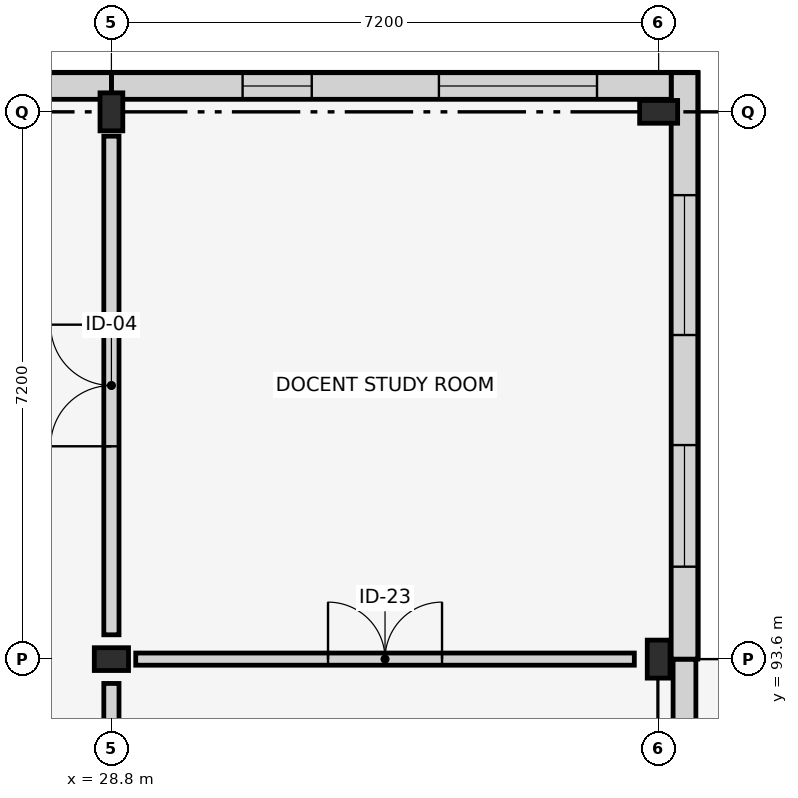
"""IFC4 building model, lengths in metres.
Left out: names, types, materials, properties, quantities, classifications, styles, units other than length and angle.
Written with IfcOpenShell. Run it as: python <this file> out.ifc"""

import sys

from ifc_helpers import new_model, si_unit, direction, frame, frame_2d, origin, origin_2d, place, context, subcontext, project, spatial, rectangle, i_section, extrude, element, fill, save


model = new_model("IFC4")
c1 = context("Model", 3, precision=1e-05, world=origin(), true_north=direction((0.0, 1.0)))
c2 = subcontext(c1, "Body", "Model", "MODEL_VIEW")
j1 = project(units=[si_unit("LENGTHUNIT", "METRE"), si_unit("PLANEANGLEUNIT", "RADIAN")], contexts=[c1])
p1 = place(None, origin())
s1 = spatial("IfcSite", under=j1, at=p1, CompositionType="ELEMENT")
p2 = place(p1, origin())
s2 = spatial("IfcBuilding", under=s1, at=p2, CompositionType="ELEMENT")
p3 = place(p2, origin())
s3 = spatial("IfcBuildingStorey", under=s2, at=p3, CompositionType="ELEMENT", Elevation=0.0)
p4 = place(p3, frame((28.8, 93.6, 0.0), z_axis=(0.0, 0.0, 1.0), x_axis=(0.0, 1.0, 0.0)))
e1 = element("IfcColumn", 1, at=p4, inside=s3, PredefinedType="COLUMN", context=c2, shape_type="SweptSolid", body=[
    extrude(i_section(OverallWidth=0.3, OverallDepth=0.45, WebThickness=0.014, FlangeThickness=0.026, FilletRadius=0.027, at=origin_2d()), origin(), (0.0, 0.0, 1.0), 4.5),
])
for number, where, z_axis, x_axis in (
    (2, (28.8, 100.8, 0.0), (0.0, 0.0, 1.0), (1.0, 0.0, 0.0)),
    (3, (36.0, 93.6, 0.0), (0.0, 0.0, 1.0), (1.0, 0.0, 0.0)),
    (4, (36.0, 100.8, 0.0), (0.0, 0.0, 1.0), (0.0, 1.0, 0.0)),
):
    element("IfcColumn", number, at=place(p3, frame(where, z_axis=z_axis, x_axis=x_axis)), inside=s3, PredefinedType="COLUMN", context=c2, shape_type="SweptSolid", body=[
        extrude(i_section(OverallWidth=0.3, OverallDepth=0.5, WebThickness=0.014, FlangeThickness=0.028, FilletRadius=0.027, at=origin_2d()), origin(), (0.0, 0.0, 1.0), 4.5),
    ])
p5 = place(p3, frame((36.34, 86.4, 0.0), z_axis=(0.0, 0.0, 1.0), x_axis=(0.0, 1.0, 0.0)))
e5 = element("IfcWall", 5, at=p5, inside=s3, PredefinedType="STANDARD", context=c2, shape_type="SweptSolid", body=[
    extrude(rectangle(XDim=7.2, YDim=0.3, at=frame_2d((3.6, 0.0))), origin(), (0.0, 0.0, 1.0), 3.95),
])
p6 = place(p5, frame((2.65, 0.0, 0.0)))
e6 = element("IfcOpeningElement", 6, at=p6, cuts=e5, PredefinedType="OPENING", context=c2, shape_type="SweptSolid", body=[
    extrude(rectangle(XDim=1.9, YDim=2.45, at=frame_2d((0.95, 1.225))), frame((0.0, 0.16, 0.0), z_axis=(0.0, -1.0, 0.0), x_axis=(1.0, 0.0, 0.0)), (0.0, 0.0, 1.0), 0.32),
])
p7 = place(p3, frame((36.34, 93.6, 0.0), z_axis=(0.0, 0.0, 1.0), x_axis=(0.0, 1.0, 0.0)))
e7 = element("IfcWall", 7, at=p7, inside=s3, PredefinedType="STANDARD", context=c2, shape_type="SweptSolid", body=[
    extrude(rectangle(XDim=7.715, YDim=0.35, at=frame_2d((3.857, 0.0))), origin(), (0.0, 0.0, 1.0), 4.5),
])
p8 = place(p7, frame((1.216, 0.0, 0.9)))
e8 = element("IfcOpeningElement", 8, at=p8, cuts=e7, PredefinedType="OPENING", context=c2, shape_type="SweptSolid", body=[
    extrude(rectangle(XDim=1.6, YDim=1.54, at=frame_2d((0.8, 0.77))), frame((0.0, 0.185, 0.0), z_axis=(0.0, -1.0, 0.0), x_axis=(1.0, 0.0, 0.0)), (0.0, 0.0, 1.0), 0.37),
])
p9 = place(p7, frame((4.264, 0.0, 0.9)))
e9 = element("IfcOpeningElement", 9, at=p9, cuts=e7, PredefinedType="OPENING", context=c2, shape_type="SweptSolid", body=[
    extrude(rectangle(XDim=1.84, YDim=1.54, at=frame_2d((0.92, 0.77))), frame((0.0, 0.185, 0.0), z_axis=(0.0, -1.0, 0.0), x_axis=(1.0, 0.0, 0.0)), (0.0, 0.0, 1.0), 0.37),
])
p10 = place(p3, frame((36.165, 101.14, 0.0), z_axis=(0.0, 0.0, 1.0), x_axis=(-1.0, 0.0, 0.0)))
e10 = element("IfcWall", 10, at=p10, inside=s3, PredefinedType="STANDARD", context=c2, shape_type="SweptSolid", body=[
    extrude(rectangle(XDim=7.365, YDim=0.35, at=frame_2d((3.683, 0.0))), origin(), (0.0, 0.0, 1.0), 4.5),
])
p11 = place(p10, frame((0.976, 0.0, 0.9)))
e11 = element("IfcOpeningElement", 11, at=p11, cuts=e10, PredefinedType="OPENING", context=c2, shape_type="SweptSolid", body=[
    extrude(rectangle(XDim=2.08, YDim=1.54, at=frame_2d((1.04, 0.77))), frame((0.0, 0.185, 0.0), z_axis=(0.0, -1.0, 0.0), x_axis=(1.0, 0.0, 0.0)), (0.0, 0.0, 1.0), 0.37),
])
p12 = place(p10, frame((4.729, 0.0, 0.9)))
e12 = element("IfcOpeningElement", 12, at=p12, cuts=e10, PredefinedType="OPENING", context=c2, shape_type="SweptSolid", body=[
    extrude(rectangle(XDim=0.91, YDim=1.68, at=frame_2d((0.455, 0.84))), frame((0.0, 0.185, 0.0), z_axis=(0.0, -1.0, 0.0), x_axis=(1.0, 0.0, 0.0)), (0.0, 0.0, 1.0), 0.37),
])
p13 = place(p3, frame((28.8, 101.14, 0.0), z_axis=(0.0, 0.0, 1.0), x_axis=(-1.0, 0.0, 0.0)))
e13 = element("IfcWall", 13, at=p13, inside=s3, PredefinedType="STANDARD", context=c2, shape_type="SweptSolid", body=[
    extrude(rectangle(XDim=7.2, YDim=0.35, at=frame_2d((3.6, 0.0))), origin(), (0.0, 0.0, 1.0), 4.5),
])
p14 = place(p13, frame((1.441, 0.0, 0.9)))
e14 = element("IfcOpeningElement", 14, at=p14, cuts=e13, PredefinedType="OPENING", context=c2, shape_type="SweptSolid", body=[
    extrude(rectangle(XDim=1.15, YDim=1.68, at=frame_2d((0.575, 0.84))), frame((0.0, 0.185, 0.0), z_axis=(0.0, -1.0, 0.0), x_axis=(1.0, 0.0, 0.0)), (0.0, 0.0, 1.0), 0.37),
])
p15 = place(p13, frame((4.489, 0.0, 0.9)))
e15 = element("IfcOpeningElement", 15, at=p15, cuts=e13, PredefinedType="OPENING", context=c2, shape_type="SweptSolid", body=[
    extrude(rectangle(XDim=1.39, YDim=1.68, at=frame_2d((0.695, 0.84))), frame((0.0, 0.185, 0.0), z_axis=(0.0, -1.0, 0.0), x_axis=(1.0, 0.0, 0.0)), (0.0, 0.0, 1.0), 0.37),
])
p16 = place(p3, frame((28.8, 72.32, 0.0), z_axis=(0.0, 0.0, 1.0), x_axis=(0.0, 1.0, 0.0)))
e16 = element("IfcWall", 16, at=p16, inside=s3, PredefinedType="PARTITIONING", context=c2, shape_type="SweptSolid", body=[
    extrude(rectangle(XDim=20.96, YDim=0.2, at=frame_2d((10.48, 0.0))), origin(), (0.0, 0.0, 1.0), 3.45),
])
p17 = place(p16, frame((9.73, 0.0, 0.0)))
e17 = element("IfcOpeningElement", 17, at=p17, cuts=e16, PredefinedType="OPENING", context=c2, shape_type="SweptSolid", body=[
    extrude(rectangle(XDim=1.5, YDim=2.25, at=frame_2d((0.75, 1.125))), frame((0.0, 0.11, 0.0), z_axis=(0.0, -1.0, 0.0), x_axis=(1.0, 0.0, 0.0)), (0.0, 0.0, 1.0), 0.22),
])
p18 = place(p3, frame((28.8, 93.92, 0.0), z_axis=(0.0, 0.0, 1.0), x_axis=(0.0, 1.0, 0.0)))
e18 = element("IfcWall", 18, at=p18, inside=s3, PredefinedType="PARTITIONING", context=c2, shape_type="SweptSolid", body=[
    extrude(rectangle(XDim=6.56, YDim=0.2, at=frame_2d((3.28, 0.0))), origin(), (0.0, 0.0, 1.0), 3.45),
])
p19 = place(p18, frame((2.48, 0.0, 0.0)))
e19 = element("IfcOpeningElement", 19, at=p19, cuts=e18, PredefinedType="OPENING", context=c2, shape_type="SweptSolid", body=[
    extrude(rectangle(XDim=1.6, YDim=2.35, at=frame_2d((0.8, 1.175))), frame((0.0, 0.11, 0.0), z_axis=(0.0, -1.0, 0.0), x_axis=(1.0, 0.0, 0.0)), (0.0, 0.0, 1.0), 0.22),
])
p20 = place(p3, frame((29.12, 93.6, 0.0), z_axis=(0.0, 0.0, 1.0), x_axis=(1.0, 0.0, 0.0)))
e20 = element("IfcWall", 20, at=p20, inside=s3, PredefinedType="PARTITIONING", context=c2, shape_type="SweptSolid", body=[
    extrude(rectangle(XDim=6.56, YDim=0.16, at=frame_2d((3.28, 0.0))), origin(), (0.0, 0.0, 1.0), 3.45),
])
p21 = place(p20, frame((2.53, 0.0, 0.0)))
e21 = element("IfcOpeningElement", 21, at=p21, cuts=e20, PredefinedType="OPENING", context=c2, shape_type="SweptSolid", body=[
    extrude(rectangle(XDim=1.5, YDim=2.5, at=frame_2d((0.75, 1.25))), frame((0.0, 0.09, 0.0), z_axis=(0.0, -1.0, 0.0), x_axis=(1.0, 0.0, 0.0)), (0.0, 0.0, 1.0), 0.18),
])
p22 = place(p8, origin())
e22 = element("IfcWindow", 22, at=p22, inside=s3, PartitioningType="SINGLE_PANEL", PredefinedType="WINDOW", context=c2, shape_type="SweptSolid", body=[
    extrude(rectangle(XDim=1.6, YDim=1.54, at=frame_2d((0.8, 0.77))), frame((0.0, 0.03, 0.0), z_axis=(0.0, -1.0, 0.0), x_axis=(1.0, 0.0, 0.0)), (0.0, 0.0, 1.0), 0.06),
])
fill(e8, e22)
p23 = place(p9, origin())
e23 = element("IfcWindow", 23, at=p23, inside=s3, PartitioningType="SINGLE_PANEL", PredefinedType="WINDOW", context=c2, shape_type="SweptSolid", body=[
    extrude(rectangle(XDim=1.84, YDim=1.54, at=frame_2d((0.92, 0.77))), frame((0.0, 0.03, 0.0), z_axis=(0.0, -1.0, 0.0), x_axis=(1.0, 0.0, 0.0)), (0.0, 0.0, 1.0), 0.06),
])
fill(e9, e23)
p24 = place(p11, origin())
e24 = element("IfcWindow", 24, at=p24, inside=s3, PartitioningType="SINGLE_PANEL", PredefinedType="WINDOW", context=c2, shape_type="SweptSolid", body=[
    extrude(rectangle(XDim=2.08, YDim=1.54, at=frame_2d((1.04, 0.77))), frame((0.0, 0.03, 0.0), z_axis=(0.0, -1.0, 0.0), x_axis=(1.0, 0.0, 0.0)), (0.0, 0.0, 1.0), 0.06),
])
fill(e11, e24)
p25 = place(p12, origin())
e25 = element("IfcWindow", 25, at=p25, inside=s3, PartitioningType="SINGLE_PANEL", PredefinedType="WINDOW", context=c2, shape_type="SweptSolid", body=[
    extrude(rectangle(XDim=0.91, YDim=1.68, at=frame_2d((0.455, 0.84))), frame((0.0, 0.03, 0.0), z_axis=(0.0, -1.0, 0.0), x_axis=(1.0, 0.0, 0.0)), (0.0, 0.0, 1.0), 0.06),
])
fill(e12, e25)
p26 = place(p19, origin())
e26 = element("IfcDoor", 26, at=p26, inside=s3, OperationType="DOUBLE_DOOR_SINGLE_SWING", PredefinedType="DOOR", context=c2, shape_type="SweptSolid", body=[
    extrude(rectangle(XDim=1.6, YDim=2.35, at=frame_2d((0.8, 1.175))), frame((0.0, 0.025, 0.0), z_axis=(0.0, -1.0, 0.0), x_axis=(1.0, 0.0, 0.0)), (0.0, 0.0, 1.0), 0.05),
])
fill(e19, e26)
p27 = place(p21, origin())
e27 = element("IfcDoor", 27, at=p27, inside=s3, OperationType="DOUBLE_DOOR_SINGLE_SWING", PredefinedType="DOOR", context=c2, shape_type="SweptSolid", body=[
    extrude(rectangle(XDim=1.5, YDim=2.5, at=frame_2d((0.75, 1.25))), frame((0.0, 0.025, 0.0), z_axis=(0.0, -1.0, 0.0), x_axis=(1.0, 0.0, 0.0)), (0.0, 0.0, 1.0), 0.05),
])
fill(e21, e27)
save(model, sys.argv[1])
